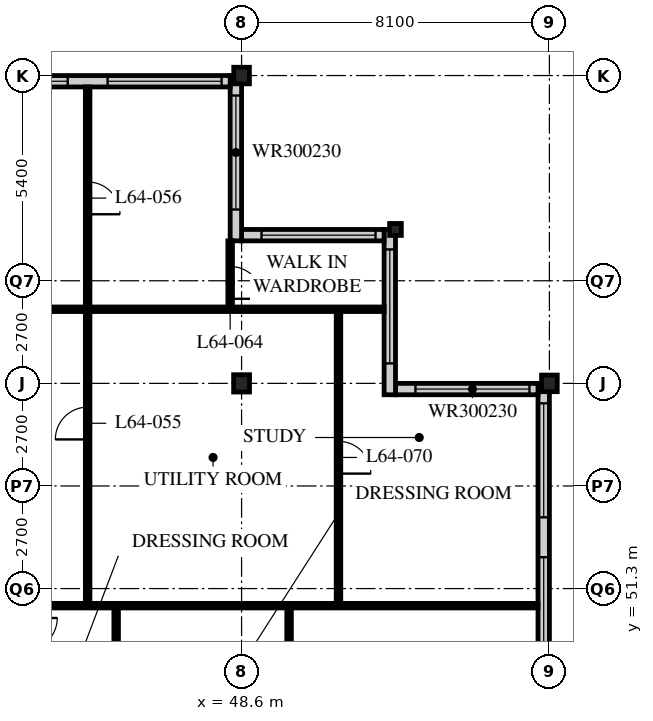
"""IFC4 building model, lengths in metres.
Left out: names, types, materials, properties, quantities, classifications, styles, units other than length and angle.
Written with IfcOpenShell. Run it as: python <this file> out.ifc"""

import sys

from ifc_helpers import new_model, si_unit, direction, frame, frame_2d, origin, origin_2d, place, context, subcontext, project, spatial, rectangle, i_section, extrude, element, fill, save


model = new_model("IFC4")
c1 = context("Model", 3, precision=1e-05, world=origin(), true_north=direction((0.0, 1.0)))
c2 = subcontext(c1, "Body", "Model", "MODEL_VIEW")
j1 = project(units=[si_unit("LENGTHUNIT", "METRE"), si_unit("PLANEANGLEUNIT", "RADIAN")], contexts=[c1])
p1 = place(None, origin())
s1 = spatial("IfcSite", under=j1, at=p1, CompositionType="ELEMENT")
p2 = place(p1, origin())
s2 = spatial("IfcBuilding", under=s1, at=p2, CompositionType="ELEMENT")
p3 = place(p2, frame((0.0, 0.0, 250.2)))
s3 = spatial("IfcBuildingStorey", under=s2, at=p3, CompositionType="ELEMENT", Elevation=250.2)
p4 = place(p3, frame((48.6, 56.7, 0.0), z_axis=(0.0, 0.0, 1.0), x_axis=(1.0, 0.0, 0.0)))
e1 = element("IfcColumn", 1, at=p4, inside=s3, PredefinedType="COLUMN", context=c2, shape_type="SweptSolid", body=[
    extrude(i_section(OverallWidth=0.418, OverallDepth=0.456, WebThickness=0.042, FlangeThickness=0.067, FilletRadius=0.015, at=origin_2d()), origin(), (0.0, 0.0, 1.0), 3.9),
])
p5 = place(p3, frame((48.6, 64.8, 0.0), z_axis=(0.0, 0.0, 1.0), x_axis=(1.0, 0.0, 0.0)))
e2 = element("IfcColumn", 2, at=p5, inside=s3, PredefinedType="COLUMN", context=c2, shape_type="SweptSolid", body=[
    extrude(i_section(OverallWidth=0.412, OverallDepth=0.437, WebThickness=0.036, FlangeThickness=0.058, FilletRadius=0.015, at=origin_2d()), origin(), (0.0, 0.0, 1.0), 3.9),
])
p6 = place(p3, frame((52.65, 60.75, 0.0), z_axis=(0.0, 0.0, 1.0), x_axis=(1.0, 0.0, 0.0)))
e3 = element("IfcColumn", 3, at=p6, inside=s3, PredefinedType="COLUMN", context=c2, shape_type="SweptSolid", body=[
    extrude(i_section(OverallWidth=0.307, OverallDepth=0.314, WebThickness=0.012, FlangeThickness=0.019, FilletRadius=0.015, at=origin_2d()), origin(), (0.0, 0.0, 1.0), 3.9),
])
p7 = place(p3, frame((56.7, 56.7, 0.0), z_axis=(0.0, 0.0, 1.0), x_axis=(1.0, 0.0, 0.0)))
e4 = element("IfcColumn", 4, at=p7, inside=s3, PredefinedType="COLUMN", context=c2, shape_type="SweptSolid", body=[
    extrude(i_section(OverallWidth=0.412, OverallDepth=0.437, WebThickness=0.036, FlangeThickness=0.058, FilletRadius=0.015, at=origin_2d()), origin(), (0.0, 0.0, 1.0), 3.9),
])
p8 = place(p3, frame((56.55, 24.6, 0.0), z_axis=(0.0, 0.0, 1.0), x_axis=(0.0, 1.0, 0.0)))
e5 = element("IfcWall", 5, at=p8, inside=s3, PredefinedType="SOLIDWALL", context=c2, shape_type="SweptSolid", body=[
    extrude(rectangle(XDim=32.1, YDim=0.3, at=frame_2d((16.05, 0.0))), origin(), (0.0, 0.0, 1.0), 3.69),
])
p9 = place(p8, frame((0.225, 0.0, 0.6)))
e6 = element("IfcOpeningElement", 6, at=p9, cuts=e5, PredefinedType="OPENING", context=c2, shape_type="SweptSolid", body=[
    extrude(rectangle(XDim=3.0, YDim=2.4, at=frame_2d((1.5, 1.2))), frame((0.0, 0.16, 0.0), z_axis=(0.0, -1.0, 0.0), x_axis=(1.0, 0.0, 0.0)), (0.0, 0.0, 1.0), 0.32),
])
p10 = place(p8, frame((4.275, 0.0, 0.6)))
e7 = element("IfcOpeningElement", 7, at=p10, cuts=e5, PredefinedType="OPENING", context=c2, shape_type="SweptSolid", body=[
    extrude(rectangle(XDim=3.0, YDim=2.4, at=frame_2d((1.5, 1.2))), frame((0.0, 0.16, 0.0), z_axis=(0.0, -1.0, 0.0), x_axis=(1.0, 0.0, 0.0)), (0.0, 0.0, 1.0), 0.32),
])
p11 = place(p8, frame((8.325, 0.0, 0.6)))
e8 = element("IfcOpeningElement", 8, at=p11, cuts=e5, PredefinedType="OPENING", context=c2, shape_type="SweptSolid", body=[
    extrude(rectangle(XDim=3.0, YDim=2.4, at=frame_2d((1.5, 1.2))), frame((0.0, 0.16, 0.0), z_axis=(0.0, -1.0, 0.0), x_axis=(1.0, 0.0, 0.0)), (0.0, 0.0, 1.0), 0.32),
])
p12 = place(p8, frame((12.375, 0.0, 0.6)))
e9 = element("IfcOpeningElement", 9, at=p12, cuts=e5, PredefinedType="OPENING", context=c2, shape_type="SweptSolid", body=[
    extrude(rectangle(XDim=3.0, YDim=2.4, at=frame_2d((1.5, 1.2))), frame((0.0, 0.16, 0.0), z_axis=(0.0, -1.0, 0.0), x_axis=(1.0, 0.0, 0.0)), (0.0, 0.0, 1.0), 0.32),
])
p13 = place(p8, frame((16.425, 0.0, 0.6)))
e10 = element("IfcOpeningElement", 10, at=p13, cuts=e5, PredefinedType="OPENING", context=c2, shape_type="SweptSolid", body=[
    extrude(rectangle(XDim=3.0, YDim=2.4, at=frame_2d((1.5, 1.2))), frame((0.0, 0.16, 0.0), z_axis=(0.0, -1.0, 0.0), x_axis=(1.0, 0.0, 0.0)), (0.0, 0.0, 1.0), 0.32),
])
p14 = place(p8, frame((20.475, 0.0, 0.6)))
e11 = element("IfcOpeningElement", 11, at=p14, cuts=e5, PredefinedType="OPENING", context=c2, shape_type="SweptSolid", body=[
    extrude(rectangle(XDim=3.0, YDim=2.4, at=frame_2d((1.5, 1.2))), frame((0.0, 0.16, 0.0), z_axis=(0.0, -1.0, 0.0), x_axis=(1.0, 0.0, 0.0)), (0.0, 0.0, 1.0), 0.32),
])
p15 = place(p8, frame((24.525, 0.0, 0.6)))
e12 = element("IfcOpeningElement", 12, at=p15, cuts=e5, PredefinedType="OPENING", context=c2, shape_type="SweptSolid", body=[
    extrude(rectangle(XDim=3.0, YDim=2.4, at=frame_2d((1.5, 1.2))), frame((0.0, 0.16, 0.0), z_axis=(0.0, -1.0, 0.0), x_axis=(1.0, 0.0, 0.0)), (0.0, 0.0, 1.0), 0.32),
])
p16 = place(p8, frame((28.575, 0.0, 0.6)))
e13 = element("IfcOpeningElement", 13, at=p16, cuts=e5, PredefinedType="OPENING", context=c2, shape_type="SweptSolid", body=[
    extrude(rectangle(XDim=3.0, YDim=2.4, at=frame_2d((1.5, 1.2))), frame((0.0, 0.16, 0.0), z_axis=(0.0, -1.0, 0.0), x_axis=(1.0, 0.0, 0.0)), (0.0, 0.0, 1.0), 0.32),
])
p17 = place(p3, frame((56.4, 56.55, 0.0), z_axis=(0.0, 0.0, 1.0), x_axis=(-1.0, 0.0, 0.0)))
e14 = element("IfcWall", 14, at=p17, inside=s3, PredefinedType="SOLIDWALL", context=c2, shape_type="SweptSolid", body=[
    extrude(rectangle(XDim=3.75, YDim=0.3, at=frame_2d((1.875, 0.0))), origin(), (0.0, 0.0, 1.0), 3.69),
])
p18 = place(p17, frame((0.225, 0.0, 0.6)))
e15 = element("IfcOpeningElement", 15, at=p18, cuts=e14, PredefinedType="OPENING", context=c2, shape_type="SweptSolid", body=[
    extrude(rectangle(XDim=3.0, YDim=2.3, at=frame_2d((1.5, 1.15))), frame((0.0, 0.16, 0.0), z_axis=(0.0, -1.0, 0.0), x_axis=(1.0, 0.0, 0.0)), (0.0, 0.0, 1.0), 0.32),
])
p19 = place(p3, frame((52.5, 56.4, 0.0), z_axis=(0.0, 0.0, 1.0), x_axis=(0.0, 1.0, 0.0)))
e16 = element("IfcWall", 16, at=p19, inside=s3, PredefinedType="SOLIDWALL", context=c2, shape_type="SweptSolid", body=[
    extrude(rectangle(XDim=4.35, YDim=0.3, at=frame_2d((2.175, 0.0))), origin(), (0.0, 0.0, 1.0), 3.69),
])
p20 = place(p19, frame((0.825, 0.0, 0.6)))
e17 = element("IfcOpeningElement", 17, at=p20, cuts=e16, PredefinedType="OPENING", context=c2, shape_type="SweptSolid", body=[
    extrude(rectangle(XDim=3.0, YDim=2.3, at=frame_2d((1.5, 1.15))), frame((0.0, 0.16, 0.0), z_axis=(0.0, -1.0, 0.0), x_axis=(1.0, 0.0, 0.0)), (0.0, 0.0, 1.0), 0.32),
])
p21 = place(p3, frame((52.35, 60.6, 0.0), z_axis=(0.0, 0.0, 1.0), x_axis=(-1.0, 0.0, 0.0)))
e18 = element("IfcWall", 18, at=p21, inside=s3, PredefinedType="SOLIDWALL", context=c2, shape_type="SweptSolid", body=[
    extrude(rectangle(XDim=3.75, YDim=0.3, at=frame_2d((1.875, 0.0))), origin(), (0.0, 0.0, 1.0), 3.69),
])
p22 = place(p21, frame((0.225, 0.0, 0.6)))
e19 = element("IfcOpeningElement", 19, at=p22, cuts=e18, PredefinedType="OPENING", context=c2, shape_type="SweptSolid", body=[
    extrude(rectangle(XDim=3.0, YDim=2.3, at=frame_2d((1.5, 1.15))), frame((0.0, 0.16, 0.0), z_axis=(0.0, -1.0, 0.0), x_axis=(1.0, 0.0, 0.0)), (0.0, 0.0, 1.0), 0.32),
])
p23 = place(p3, frame((48.45, 60.45, 0.0), z_axis=(0.0, 0.0, 1.0), x_axis=(0.0, 1.0, 0.0)))
e20 = element("IfcWall", 20, at=p23, inside=s3, PredefinedType="SOLIDWALL", context=c2, shape_type="SweptSolid", body=[
    extrude(rectangle(XDim=4.35, YDim=0.3, at=frame_2d((2.175, 0.0))), origin(), (0.0, 0.0, 1.0), 3.69),
])
p24 = place(p23, frame((0.825, 0.0, 0.6)))
e21 = element("IfcOpeningElement", 21, at=p24, cuts=e20, PredefinedType="OPENING", context=c2, shape_type="SweptSolid", body=[
    extrude(rectangle(XDim=3.0, YDim=2.3, at=frame_2d((1.5, 1.15))), frame((0.0, 0.16, 0.0), z_axis=(0.0, -1.0, 0.0), x_axis=(1.0, 0.0, 0.0)), (0.0, 0.0, 1.0), 0.32),
])
p25 = place(p3, frame((48.3, 64.65, 0.0), z_axis=(0.0, 0.0, 1.0), x_axis=(-1.0, 0.0, 0.0)))
e22 = element("IfcWall", 22, at=p25, inside=s3, PredefinedType="SOLIDWALL", context=c2, shape_type="SweptSolid", body=[
    extrude(rectangle(XDim=40.2, YDim=0.3, at=frame_2d((20.1, 0.0))), origin(), (0.0, 0.0, 1.0), 3.69),
])
p26 = place(p25, frame((0.225, 0.0, 0.6)))
e23 = element("IfcOpeningElement", 23, at=p26, cuts=e22, PredefinedType="OPENING", context=c2, shape_type="SweptSolid", body=[
    extrude(rectangle(XDim=3.0, YDim=2.4, at=frame_2d((1.5, 1.2))), frame((0.0, 0.16, 0.0), z_axis=(0.0, -1.0, 0.0), x_axis=(1.0, 0.0, 0.0)), (0.0, 0.0, 1.0), 0.32),
])
p27 = place(p25, frame((4.275, 0.0, 0.6)))
e24 = element("IfcOpeningElement", 24, at=p27, cuts=e22, PredefinedType="OPENING", context=c2, shape_type="SweptSolid", body=[
    extrude(rectangle(XDim=3.0, YDim=2.4, at=frame_2d((1.5, 1.2))), frame((0.0, 0.16, 0.0), z_axis=(0.0, -1.0, 0.0), x_axis=(1.0, 0.0, 0.0)), (0.0, 0.0, 1.0), 0.32),
])
p28 = place(p25, frame((8.325, 0.0, 0.6)))
e25 = element("IfcOpeningElement", 25, at=p28, cuts=e22, PredefinedType="OPENING", context=c2, shape_type="SweptSolid", body=[
    extrude(rectangle(XDim=3.0, YDim=2.4, at=frame_2d((1.5, 1.2))), frame((0.0, 0.16, 0.0), z_axis=(0.0, -1.0, 0.0), x_axis=(1.0, 0.0, 0.0)), (0.0, 0.0, 1.0), 0.32),
])
p29 = place(p25, frame((12.375, 0.0, 0.6)))
e26 = element("IfcOpeningElement", 26, at=p29, cuts=e22, PredefinedType="OPENING", context=c2, shape_type="SweptSolid", body=[
    extrude(rectangle(XDim=3.0, YDim=2.4, at=frame_2d((1.5, 1.2))), frame((0.0, 0.16, 0.0), z_axis=(0.0, -1.0, 0.0), x_axis=(1.0, 0.0, 0.0)), (0.0, 0.0, 1.0), 0.32),
])
p30 = place(p25, frame((16.425, 0.0, 0.6)))
e27 = element("IfcOpeningElement", 27, at=p30, cuts=e22, PredefinedType="OPENING", context=c2, shape_type="SweptSolid", body=[
    extrude(rectangle(XDim=3.0, YDim=2.4, at=frame_2d((1.5, 1.2))), frame((0.0, 0.16, 0.0), z_axis=(0.0, -1.0, 0.0), x_axis=(1.0, 0.0, 0.0)), (0.0, 0.0, 1.0), 0.32),
])
p31 = place(p25, frame((20.475, 0.0, 0.6)))
e28 = element("IfcOpeningElement", 28, at=p31, cuts=e22, PredefinedType="OPENING", context=c2, shape_type="SweptSolid", body=[
    extrude(rectangle(XDim=3.0, YDim=2.4, at=frame_2d((1.5, 1.2))), frame((0.0, 0.16, 0.0), z_axis=(0.0, -1.0, 0.0), x_axis=(1.0, 0.0, 0.0)), (0.0, 0.0, 1.0), 0.32),
])
p32 = place(p25, frame((24.525, 0.0, 0.6)))
e29 = element("IfcOpeningElement", 29, at=p32, cuts=e22, PredefinedType="OPENING", context=c2, shape_type="SweptSolid", body=[
    extrude(rectangle(XDim=3.0, YDim=2.4, at=frame_2d((1.5, 1.2))), frame((0.0, 0.16, 0.0), z_axis=(0.0, -1.0, 0.0), x_axis=(1.0, 0.0, 0.0)), (0.0, 0.0, 1.0), 0.32),
])
p33 = place(p25, frame((28.575, 0.0, 0.6)))
e30 = element("IfcOpeningElement", 30, at=p33, cuts=e22, PredefinedType="OPENING", context=c2, shape_type="SweptSolid", body=[
    extrude(rectangle(XDim=3.0, YDim=2.4, at=frame_2d((1.5, 1.2))), frame((0.0, 0.16, 0.0), z_axis=(0.0, -1.0, 0.0), x_axis=(1.0, 0.0, 0.0)), (0.0, 0.0, 1.0), 0.32),
])
p34 = place(p25, frame((32.625, 0.0, 0.6)))
e31 = element("IfcOpeningElement", 31, at=p34, cuts=e22, PredefinedType="OPENING", context=c2, shape_type="SweptSolid", body=[
    extrude(rectangle(XDim=3.0, YDim=2.4, at=frame_2d((1.5, 1.2))), frame((0.0, 0.16, 0.0), z_axis=(0.0, -1.0, 0.0), x_axis=(1.0, 0.0, 0.0)), (0.0, 0.0, 1.0), 0.32),
])
p35 = place(p25, frame((36.675, 0.0, 0.6)))
e32 = element("IfcOpeningElement", 32, at=p35, cuts=e22, PredefinedType="OPENING", context=c2, shape_type="SweptSolid", body=[
    extrude(rectangle(XDim=3.0, YDim=2.4, at=frame_2d((1.5, 1.2))), frame((0.0, 0.16, 0.0), z_axis=(0.0, -1.0, 0.0), x_axis=(1.0, 0.0, 0.0)), (0.0, 0.0, 1.0), 0.32),
])
p36 = place(p3, frame((42.9, 50.85, 0.0), z_axis=(0.0, 0.0, 1.0), x_axis=(1.0, 0.0, 0.0)))
e33 = element("IfcWall", 33, at=p36, inside=s3, PredefinedType="PARTITIONING", context=c2, shape_type="SweptSolid", body=[
    extrude(rectangle(XDim=13.5, YDim=0.12, at=frame_2d((6.75, 0.0))), origin(), (0.0, 0.0, 1.0), 3.69),
])
p37 = place(p3, frame((36.45, 58.65, 0.0), z_axis=(0.0, 0.0, 1.0), x_axis=(1.0, 0.0, 0.0)))
e34 = element("IfcWall", 34, at=p37, inside=s3, PredefinedType="PARTITIONING", context=c2, shape_type="SweptSolid", body=[
    extrude(rectangle(XDim=15.9, YDim=0.12, at=frame_2d((7.95, 0.0))), origin(), (0.0, 0.0, 1.0), 3.69),
])
p38 = place(p37, frame((1.675, 0.0, 0.0)))
e35 = element("IfcOpeningElement", 35, at=p38, cuts=e34, PredefinedType="OPENING", context=c2, shape_type="SweptSolid", body=[
    extrude(rectangle(XDim=0.85, YDim=2.1, at=frame_2d((0.425, 1.05))), frame((0.0, 0.07, 0.0), z_axis=(0.0, -1.0, 0.0), x_axis=(1.0, 0.0, 0.0)), (0.0, 0.0, 1.0), 0.14),
])
p39 = place(p3, frame((44.55, 64.5, 0.0), z_axis=(0.0, 0.0, 1.0), x_axis=(0.0, -1.0, 0.0)))
e36 = element("IfcWall", 36, at=p39, inside=s3, PredefinedType="PARTITIONING", context=c2, shape_type="SweptSolid", body=[
    extrude(rectangle(XDim=13.65, YDim=0.12, at=frame_2d((6.825, 0.0))), origin(), (0.0, 0.0, 1.0), 3.69),
])
p40 = place(p39, frame((8.425, 0.0, 0.0)))
e37 = element("IfcOpeningElement", 37, at=p40, cuts=e36, PredefinedType="OPENING", context=c2, shape_type="SweptSolid", body=[
    extrude(rectangle(XDim=0.85, YDim=2.1, at=frame_2d((0.425, 1.05))), frame((0.0, 0.07, 0.0), z_axis=(0.0, -1.0, 0.0), x_axis=(1.0, 0.0, 0.0)), (0.0, 0.0, 1.0), 0.14),
])
p41 = place(p39, frame((2.5, 0.0, 0.0)))
e38 = element("IfcOpeningElement", 38, at=p41, cuts=e36, PredefinedType="OPENING", context=c2, shape_type="SweptSolid", body=[
    extrude(rectangle(XDim=0.85, YDim=2.1, at=frame_2d((0.425, 1.05))), frame((0.0, 0.07, 0.0), z_axis=(0.0, -1.0, 0.0), x_axis=(1.0, 0.0, 0.0)), (0.0, 0.0, 1.0), 0.14),
])
p42 = place(p3, frame((48.3, 58.65, 0.0), z_axis=(0.0, 0.0, 1.0), x_axis=(0.0, 1.0, 0.0)))
e39 = element("IfcWall", 39, at=p42, inside=s3, PredefinedType="PARTITIONING", context=c2, shape_type="SweptSolid", body=[
    extrude(rectangle(XDim=1.8, YDim=0.12, at=frame_2d((0.9, 0.0))), origin(), (0.0, 0.0, 1.0), 3.69),
])
p43 = place(p42, frame((0.275, 0.0, 0.0)))
e40 = element("IfcOpeningElement", 40, at=p43, cuts=e39, PredefinedType="OPENING", context=c2, shape_type="SweptSolid", body=[
    extrude(rectangle(XDim=0.85, YDim=2.1, at=frame_2d((0.425, 1.05))), frame((0.0, 0.07, 0.0), z_axis=(0.0, -1.0, 0.0), x_axis=(1.0, 0.0, 0.0)), (0.0, 0.0, 1.0), 0.14),
])
p44 = place(p3, frame((45.3, 50.85, 0.0), z_axis=(0.0, 0.0, 1.0), x_axis=(0.0, -1.0, 0.0)))
e41 = element("IfcWall", 41, at=p44, inside=s3, PredefinedType="PARTITIONING", context=c2, shape_type="SweptSolid", body=[
    extrude(rectangle(XDim=4.01, YDim=0.12, at=frame_2d((2.005, 0.0))), origin(), (0.0, 0.0, 1.0), 3.69),
])
p45 = place(p44, frame((2.885, 0.0, 0.0)))
e42 = element("IfcOpeningElement", 42, at=p45, cuts=e41, PredefinedType="OPENING", context=c2, shape_type="SweptSolid", body=[
    extrude(rectangle(XDim=0.85, YDim=2.1, at=frame_2d((0.425, 1.05))), frame((0.0, 0.07, 0.0), z_axis=(0.0, -1.0, 0.0), x_axis=(1.0, 0.0, 0.0)), (0.0, 0.0, 1.0), 0.14),
])
p46 = place(p3, frame((51.15, 50.85, 0.0), z_axis=(0.0, 0.0, 1.0), x_axis=(0.0, 1.0, 0.0)))
e43 = element("IfcWall", 43, at=p46, inside=s3, PredefinedType="PARTITIONING", context=c2, shape_type="SweptSolid", body=[
    extrude(rectangle(XDim=7.8, YDim=0.12, at=frame_2d((3.9, 0.0))), origin(), (0.0, 0.0, 1.0), 3.69),
])
p47 = place(p46, frame((3.475, 0.0, 0.0)))
e44 = element("IfcOpeningElement", 44, at=p47, cuts=e43, PredefinedType="OPENING", context=c2, shape_type="SweptSolid", body=[
    extrude(rectangle(XDim=0.85, YDim=2.1, at=frame_2d((0.425, 1.05))), frame((0.0, 0.07, 0.0), z_axis=(0.0, -1.0, 0.0), x_axis=(1.0, 0.0, 0.0)), (0.0, 0.0, 1.0), 0.14),
])
p48 = place(p3, frame((49.85, 44.55, 0.0), z_axis=(0.0, 0.0, 1.0), x_axis=(0.0, 1.0, 0.0)))
e45 = element("IfcWall", 45, at=p48, inside=s3, PredefinedType="PARTITIONING", context=c2, shape_type="SweptSolid", body=[
    extrude(rectangle(XDim=6.3, YDim=0.12, at=frame_2d((3.15, 0.0))), origin(), (0.0, 0.0, 1.0), 3.69),
])
p49 = place(p48, frame((2.725, 0.0, 0.0)))
e46 = element("IfcOpeningElement", 46, at=p49, cuts=e45, PredefinedType="OPENING", context=c2, shape_type="SweptSolid", body=[
    extrude(rectangle(XDim=0.85, YDim=2.1, at=frame_2d((0.425, 1.05))), frame((0.0, 0.07, 0.0), z_axis=(0.0, -1.0, 0.0), x_axis=(1.0, 0.0, 0.0)), (0.0, 0.0, 1.0), 0.14),
])
p50 = place(p15, origin())
e47 = element("IfcWindow", 47, at=p50, inside=s3, PartitioningType="SINGLE_PANEL", PredefinedType="WINDOW", context=c2, shape_type="SweptSolid", body=[
    extrude(rectangle(XDim=3.0, YDim=2.4, at=frame_2d((1.5, 1.2))), frame((0.0, 0.03, 0.0), z_axis=(0.0, -1.0, 0.0), x_axis=(1.0, 0.0, 0.0)), (0.0, 0.0, 1.0), 0.06),
])
fill(e12, e47)
p51 = place(p16, origin())
e48 = element("IfcWindow", 48, at=p51, inside=s3, PartitioningType="SINGLE_PANEL", PredefinedType="WINDOW", context=c2, shape_type="SweptSolid", body=[
    extrude(rectangle(XDim=3.0, YDim=2.4, at=frame_2d((1.5, 1.2))), frame((0.0, 0.03, 0.0), z_axis=(0.0, -1.0, 0.0), x_axis=(1.0, 0.0, 0.0)), (0.0, 0.0, 1.0), 0.06),
])
fill(e13, e48)
p52 = place(p18, origin())
e49 = element("IfcWindow", 49, at=p52, inside=s3, PartitioningType="SINGLE_PANEL", PredefinedType="WINDOW", context=c2, shape_type="SweptSolid", body=[
    extrude(rectangle(XDim=3.0, YDim=2.3, at=frame_2d((1.5, 1.15))), frame((0.0, 0.03, 0.0), z_axis=(0.0, -1.0, 0.0), x_axis=(1.0, 0.0, 0.0)), (0.0, 0.0, 1.0), 0.06),
])
fill(e15, e49)
p53 = place(p20, origin())
e50 = element("IfcWindow", 50, at=p53, inside=s3, PartitioningType="SINGLE_PANEL", PredefinedType="WINDOW", context=c2, shape_type="SweptSolid", body=[
    extrude(rectangle(XDim=3.0, YDim=2.3, at=frame_2d((1.5, 1.15))), frame((0.0, 0.03, 0.0), z_axis=(0.0, -1.0, 0.0), x_axis=(1.0, 0.0, 0.0)), (0.0, 0.0, 1.0), 0.06),
])
fill(e17, e50)
p54 = place(p22, origin())
e51 = element("IfcWindow", 51, at=p54, inside=s3, PartitioningType="SINGLE_PANEL", PredefinedType="WINDOW", context=c2, shape_type="SweptSolid", body=[
    extrude(rectangle(XDim=3.0, YDim=2.3, at=frame_2d((1.5, 1.15))), frame((0.0, 0.03, 0.0), z_axis=(0.0, -1.0, 0.0), x_axis=(1.0, 0.0, 0.0)), (0.0, 0.0, 1.0), 0.06),
])
fill(e19, e51)
p55 = place(p24, origin())
e52 = element("IfcWindow", 52, at=p55, inside=s3, PartitioningType="SINGLE_PANEL", PredefinedType="WINDOW", context=c2, shape_type="SweptSolid", body=[
    extrude(rectangle(XDim=3.0, YDim=2.3, at=frame_2d((1.5, 1.15))), frame((0.0, 0.03, 0.0), z_axis=(0.0, -1.0, 0.0), x_axis=(1.0, 0.0, 0.0)), (0.0, 0.0, 1.0), 0.06),
])
fill(e21, e52)
p56 = place(p26, origin())
e53 = element("IfcWindow", 53, at=p56, inside=s3, PartitioningType="SINGLE_PANEL", PredefinedType="WINDOW", context=c2, shape_type="SweptSolid", body=[
    extrude(rectangle(XDim=3.0, YDim=2.4, at=frame_2d((1.5, 1.2))), frame((0.0, 0.03, 0.0), z_axis=(0.0, -1.0, 0.0), x_axis=(1.0, 0.0, 0.0)), (0.0, 0.0, 1.0), 0.06),
])
fill(e23, e53)
p57 = place(p27, origin())
e54 = element("IfcWindow", 54, at=p57, inside=s3, PartitioningType="SINGLE_PANEL", PredefinedType="WINDOW", context=c2, shape_type="SweptSolid", body=[
    extrude(rectangle(XDim=3.0, YDim=2.4, at=frame_2d((1.5, 1.2))), frame((0.0, 0.03, 0.0), z_axis=(0.0, -1.0, 0.0), x_axis=(1.0, 0.0, 0.0)), (0.0, 0.0, 1.0), 0.06),
])
fill(e24, e54)
p58 = place(p40, origin())
e55 = element("IfcDoor", 55, at=p58, inside=s3, OperationType="SINGLE_SWING_LEFT", PredefinedType="DOOR", context=c2, shape_type="SweptSolid", body=[
    extrude(rectangle(XDim=0.85, YDim=2.1, at=frame_2d((0.425, 1.05))), frame((0.0, 0.025, 0.0), z_axis=(0.0, -1.0, 0.0), x_axis=(1.0, 0.0, 0.0)), (0.0, 0.0, 1.0), 0.05),
])
fill(e37, e55)
p59 = place(p41, origin())
e56 = element("IfcDoor", 56, at=p59, inside=s3, OperationType="SINGLE_SWING_RIGHT", PredefinedType="DOOR", context=c2, shape_type="SweptSolid", body=[
    extrude(rectangle(XDim=0.85, YDim=2.1, at=frame_2d((0.425, 1.05))), frame((0.0, 0.025, 0.0), z_axis=(0.0, -1.0, 0.0), x_axis=(1.0, 0.0, 0.0)), (0.0, 0.0, 1.0), 0.05),
])
fill(e38, e56)
p60 = place(p43, origin())
e57 = element("IfcDoor", 57, at=p60, inside=s3, OperationType="SINGLE_SWING_RIGHT", PredefinedType="DOOR", context=c2, shape_type="SweptSolid", body=[
    extrude(rectangle(XDim=0.85, YDim=2.1, at=frame_2d((0.425, 1.05))), frame((0.0, 0.025, 0.0), z_axis=(0.0, -1.0, 0.0), x_axis=(1.0, 0.0, 0.0)), (0.0, 0.0, 1.0), 0.05),
])
fill(e40, e57)
p61 = place(p47, origin())
e58 = element("IfcDoor", 58, at=p61, inside=s3, OperationType="SINGLE_SWING_RIGHT", PredefinedType="DOOR", context=c2, shape_type="SweptSolid", body=[
    extrude(rectangle(XDim=0.85, YDim=2.1, at=frame_2d((0.425, 1.05))), frame((0.0, 0.025, 0.0), z_axis=(0.0, -1.0, 0.0), x_axis=(1.0, 0.0, 0.0)), (0.0, 0.0, 1.0), 0.05),
])
fill(e44, e58)
save(model, sys.argv[1])
